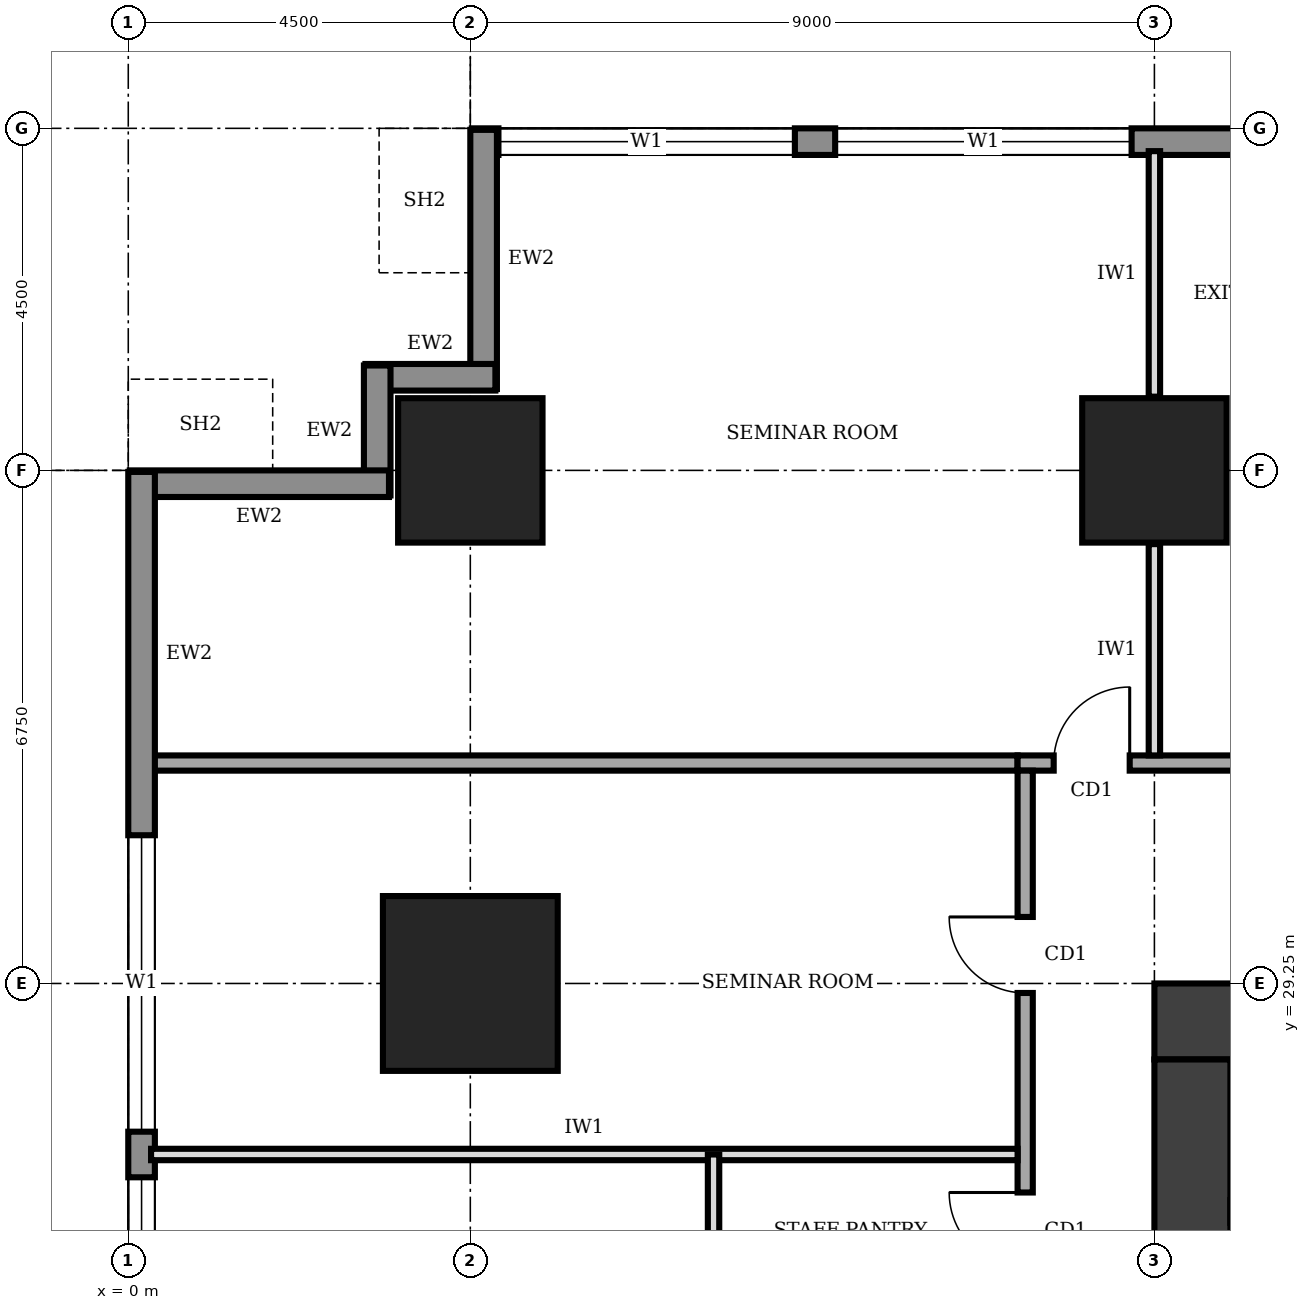
"""IFC4 building model, lengths in metres.
Left out: names, types, materials, properties, quantities, classifications, styles, units other than length and angle.
Written with IfcOpenShell. Run it as: python <this file> out.ifc"""

import sys

from ifc_helpers import new_model, si_unit, direction, frame, frame_2d, origin, origin_2d, place, context, subcontext, project, spatial, rectangle, extrude, element, fill, save


model = new_model("IFC4")
c1 = context("Model", 3, precision=1e-05, world=origin(), true_north=direction((0.0, 1.0)))
c2 = subcontext(c1, "Body", "Model", "MODEL_VIEW")
j1 = project(units=[si_unit("LENGTHUNIT", "METRE"), si_unit("PLANEANGLEUNIT", "RADIAN")], contexts=[c1])
p1 = place(None, origin())
s1 = spatial("IfcSite", under=j1, at=p1, CompositionType="ELEMENT")
p2 = place(p1, origin())
s2 = spatial("IfcBuilding", under=s1, at=p2, CompositionType="ELEMENT")
p3 = place(p2, frame((0.0, 0.0, 105.0)))
s3 = spatial("IfcBuildingStorey", under=s2, at=p3, CompositionType="ELEMENT", Elevation=105.0)
p4 = place(p3, frame((27.0, 28.75, 0.0), z_axis=(0.0, 0.0, 1.0), x_axis=(-1.0, 0.0, 0.0)))
e1 = element("IfcWall", 1, at=p4, inside=s3, PredefinedType="SHEAR", context=c2, shape_type="SweptSolid", body=[
    extrude(rectangle(XDim=13.5, YDim=1.0, at=frame_2d((6.75, 0.0))), origin(), (0.0, 0.0, 1.0), 4.0),
])
p5 = place(p4, frame((4.75, 0.0, 0.0)))
e2 = element("IfcOpeningElement", 2, at=p5, cuts=e1, PredefinedType="OPENING", context=c2, shape_type="SweptSolid", body=[
    extrude(rectangle(XDim=1.8, YDim=2.1, at=frame_2d((0.9, 1.05))), frame((0.0, 0.51, 0.0), z_axis=(0.0, -1.0, 0.0), x_axis=(1.0, 0.0, 0.0)), (0.0, 0.0, 1.0), 1.02),
])
p6 = place(p3, frame((14.0, 28.25, 0.0), z_axis=(0.0, 0.0, 1.0), x_axis=(0.0, -1.0, 0.0)))
e3 = element("IfcWall", 3, at=p6, inside=s3, PredefinedType="SHEAR", context=c2, shape_type="SweptSolid", body=[
    extrude(rectangle(XDim=16.0, YDim=1.0, at=frame_2d((8.0, 0.0))), origin(), (0.0, 0.0, 1.0), 4.0),
])
p7 = place(p3, frame((4.5, 29.25, 0.0), z_axis=(0.0, 0.0, 1.0), x_axis=(1.0, 0.0, 0.0)))
e4 = element("IfcColumn", 4, at=p7, inside=s3, PredefinedType="COLUMN", context=c2, shape_type="SweptSolid", body=[
    extrude(rectangle(XDim=2.3, YDim=2.3, at=origin_2d()), origin(), (0.0, 0.0, 1.0), 4.0),
])
for number, where, z_axis, x_axis in (
    (5, (4.5, 36.0, 0.0), (0.0, 0.0, 1.0), (1.0, 0.0, 0.0)),
    (6, (13.5, 36.0, 0.0), (0.0, 0.0, 1.0), (1.0, 0.0, 0.0)),
):
    element("IfcColumn", number, at=place(p3, frame(where, z_axis=z_axis, x_axis=x_axis)), inside=s3, PredefinedType="COLUMN", context=c2, shape_type="SweptSolid", body=[
        extrude(rectangle(XDim=1.9, YDim=1.9, at=origin_2d()), origin(), (0.0, 0.0, 1.0), 4.0),
    ])
p8 = place(p3, frame((35.98, 40.325, 0.0), z_axis=(0.0, 0.0, 1.0), x_axis=(-1.0, 0.0, 0.0)))
e7 = element("IfcWall", 7, at=p8, inside=s3, PredefinedType="STANDARD", context=c2, shape_type="SweptSolid", body=[
    extrude(rectangle(XDim=31.46, YDim=0.35, at=frame_2d((15.73, 0.0))), origin(), (0.0, 0.0, 1.0), 3.75),
])
p9 = place(p8, frame((27.21, 0.0, 0.9)))
e8 = element("IfcOpeningElement", 8, at=p9, cuts=e7, PredefinedType="OPENING", context=c2, shape_type="SweptSolid", body=[
    extrude(rectangle(XDim=3.9, YDim=2.2, at=frame_2d((1.95, 1.1))), frame((0.0, 0.185, 0.0), z_axis=(0.0, -1.0, 0.0), x_axis=(1.0, 0.0, 0.0)), (0.0, 0.0, 1.0), 0.37),
])
p10 = place(p8, frame((22.78, 0.0, 0.9)))
e9 = element("IfcOpeningElement", 9, at=p10, cuts=e7, PredefinedType="OPENING", context=c2, shape_type="SweptSolid", body=[
    extrude(rectangle(XDim=3.9, YDim=2.2, at=frame_2d((1.95, 1.1))), frame((0.0, 0.185, 0.0), z_axis=(0.0, -1.0, 0.0), x_axis=(1.0, 0.0, 0.0)), (0.0, 0.0, 1.0), 0.37),
])
p11 = place(p8, frame((4.78, 0.0, 0.9)))
e10 = element("IfcOpeningElement", 10, at=p11, cuts=e7, PredefinedType="OPENING", context=c2, shape_type="SweptSolid", body=[
    extrude(rectangle(XDim=3.9, YDim=2.2, at=frame_2d((1.95, 1.1))), frame((0.0, 0.185, 0.0), z_axis=(0.0, -1.0, 0.0), x_axis=(1.0, 0.0, 0.0)), (0.0, 0.0, 1.0), 0.37),
])
p12 = place(p3, frame((4.675, 40.48, 0.0), z_axis=(0.0, 0.0, 1.0), x_axis=(0.0, -1.0, 0.0)))
e11 = element("IfcWall", 11, at=p12, inside=s3, PredefinedType="STANDARD", context=c2, shape_type="SweptSolid", body=[
    extrude(rectangle(XDim=3.41, YDim=0.35, at=frame_2d((1.705, 0.0))), origin(), (0.0, 0.0, 1.0), 2.85),
])
for number, where, z_axis, x_axis in (
    (12, (4.83, 37.225, 0.0), (0.0, 0.0, 1.0), (-1.0, 0.0, 0.0)),
    (13, (3.275, 37.38, 0.0), (0.0, 0.0, 1.0), (0.0, -1.0, 0.0)),
):
    element("IfcWall", number, at=place(p3, frame(where, z_axis=z_axis, x_axis=x_axis)), inside=s3, PredefinedType="STANDARD", context=c2, shape_type="SweptSolid", body=[
        extrude(rectangle(XDim=1.71, YDim=0.35, at=frame_2d((0.855, 0.0))), origin(), (0.0, 0.0, 1.0), 3.75),
    ])
p13 = place(p3, frame((3.43, 35.825, 0.0), z_axis=(0.0, 0.0, 1.0), x_axis=(-1.0, 0.0, 0.0)))
e14 = element("IfcWall", 14, at=p13, inside=s3, PredefinedType="STANDARD", context=c2, shape_type="SweptSolid", body=[
    extrude(rectangle(XDim=3.41, YDim=0.35, at=frame_2d((1.705, 0.0))), origin(), (0.0, 0.0, 1.0), 2.85),
])
p14 = place(p3, frame((0.175, 35.98, 0.0), z_axis=(0.0, 0.0, 1.0), x_axis=(0.0, -1.0, 0.0)))
e15 = element("IfcWall", 15, at=p14, inside=s3, PredefinedType="STANDARD", context=c2, shape_type="SweptSolid", body=[
    extrude(rectangle(XDim=31.46, YDim=0.35, at=frame_2d((15.73, 0.0))), origin(), (0.0, 0.0, 1.0), 3.75),
])
p15 = place(p14, frame((27.21, 0.0, 0.9)))
e16 = element("IfcOpeningElement", 16, at=p15, cuts=e15, PredefinedType="OPENING", context=c2, shape_type="SweptSolid", body=[
    extrude(rectangle(XDim=3.9, YDim=2.2, at=frame_2d((1.95, 1.1))), frame((0.0, 0.185, 0.0), z_axis=(0.0, -1.0, 0.0), x_axis=(1.0, 0.0, 0.0)), (0.0, 0.0, 1.0), 0.37),
])
p16 = place(p14, frame((22.78, 0.0, 0.9)))
e17 = element("IfcOpeningElement", 17, at=p16, cuts=e15, PredefinedType="OPENING", context=c2, shape_type="SweptSolid", body=[
    extrude(rectangle(XDim=3.9, YDim=2.2, at=frame_2d((1.95, 1.1))), frame((0.0, 0.185, 0.0), z_axis=(0.0, -1.0, 0.0), x_axis=(1.0, 0.0, 0.0)), (0.0, 0.0, 1.0), 0.37),
])
p17 = place(p14, frame((18.28, 0.0, 0.9)))
e18 = element("IfcOpeningElement", 18, at=p17, cuts=e15, PredefinedType="OPENING", context=c2, shape_type="SweptSolid", body=[
    extrude(rectangle(XDim=3.9, YDim=2.2, at=frame_2d((1.95, 1.1))), frame((0.0, 0.185, 0.0), z_axis=(0.0, -1.0, 0.0), x_axis=(1.0, 0.0, 0.0)), (0.0, 0.0, 1.0), 0.37),
])
p18 = place(p14, frame((13.78, 0.0, 0.9)))
e19 = element("IfcOpeningElement", 19, at=p18, cuts=e15, PredefinedType="OPENING", context=c2, shape_type="SweptSolid", body=[
    extrude(rectangle(XDim=3.9, YDim=2.2, at=frame_2d((1.95, 1.1))), frame((0.0, 0.185, 0.0), z_axis=(0.0, -1.0, 0.0), x_axis=(1.0, 0.0, 0.0)), (0.0, 0.0, 1.0), 0.37),
])
p19 = place(p14, frame((9.28, 0.0, 0.9)))
e20 = element("IfcOpeningElement", 20, at=p19, cuts=e15, PredefinedType="OPENING", context=c2, shape_type="SweptSolid", body=[
    extrude(rectangle(XDim=3.9, YDim=2.2, at=frame_2d((1.95, 1.1))), frame((0.0, 0.185, 0.0), z_axis=(0.0, -1.0, 0.0), x_axis=(1.0, 0.0, 0.0)), (0.0, 0.0, 1.0), 0.37),
])
p20 = place(p14, frame((4.78, 0.0, 0.9)))
e21 = element("IfcOpeningElement", 21, at=p20, cuts=e15, PredefinedType="OPENING", context=c2, shape_type="SweptSolid", body=[
    extrude(rectangle(XDim=3.9, YDim=2.2, at=frame_2d((1.95, 1.1))), frame((0.0, 0.185, 0.0), z_axis=(0.0, -1.0, 0.0), x_axis=(1.0, 0.0, 0.0)), (0.0, 0.0, 1.0), 0.37),
])
p21 = place(p3, frame((28.6, 32.15, 0.0), z_axis=(0.0, 0.0, 1.0), x_axis=(-1.0, 0.0, 0.0)))
e22 = element("IfcWall", 22, at=p21, inside=s3, PredefinedType="SOLIDWALL", context=c2, shape_type="SweptSolid", body=[
    extrude(rectangle(XDim=16.9, YDim=0.2, at=frame_2d((8.45, 0.0))), origin(), (0.0, 0.0, 1.0), 3.75),
])
p22 = place(p21, frame((15.425, 0.0, 0.0)))
e23 = element("IfcOpeningElement", 23, at=p22, cuts=e22, PredefinedType="OPENING", context=c2, shape_type="SweptSolid", body=[
    extrude(rectangle(XDim=1.0, YDim=2.1, at=frame_2d((0.5, 1.05))), frame((0.0, 0.11, 0.0), z_axis=(0.0, -1.0, 0.0), x_axis=(1.0, 0.0, 0.0)), (0.0, 0.0, 1.0), 0.22),
])
p23 = place(p21, frame((12.35, 0.0, 0.0)))
e24 = element("IfcOpeningElement", 24, at=p23, cuts=e22, PredefinedType="OPENING", context=c2, shape_type="SweptSolid", body=[
    extrude(rectangle(XDim=1.0, YDim=2.1, at=frame_2d((0.5, 1.05))), frame((0.0, 0.11, 0.0), z_axis=(0.0, -1.0, 0.0), x_axis=(1.0, 0.0, 0.0)), (0.0, 0.0, 1.0), 0.22),
])
p24 = place(p21, frame((5.6, 0.0, 0.0)))
e25 = element("IfcOpeningElement", 25, at=p24, cuts=e22, PredefinedType="OPENING", context=c2, shape_type="SweptSolid", body=[
    extrude(rectangle(XDim=1.0, YDim=2.1, at=frame_2d((0.5, 1.05))), frame((0.0, 0.11, 0.0), z_axis=(0.0, -1.0, 0.0), x_axis=(1.0, 0.0, 0.0)), (0.0, 0.0, 1.0), 0.22),
])
p25 = place(p21, frame((0.275, 0.0, 0.0)))
e26 = element("IfcOpeningElement", 26, at=p25, cuts=e22, PredefinedType="OPENING", context=c2, shape_type="SweptSolid", body=[
    extrude(rectangle(XDim=1.0, YDim=2.1, at=frame_2d((0.5, 1.05))), frame((0.0, 0.11, 0.0), z_axis=(0.0, -1.0, 0.0), x_axis=(1.0, 0.0, 0.0)), (0.0, 0.0, 1.0), 0.22),
])
p26 = place(p3, frame((11.8, 32.05, 0.0), z_axis=(0.0, 0.0, 1.0), x_axis=(0.0, -1.0, 0.0)))
e27 = element("IfcWall", 27, at=p26, inside=s3, PredefinedType="SOLIDWALL", context=c2, shape_type="SweptSolid", body=[
    extrude(rectangle(XDim=23.8, YDim=0.2, at=frame_2d((11.9, 0.0))), origin(), (0.0, 0.0, 1.0), 3.75),
])
p27 = place(p26, frame((20.675, 0.0, 0.0)))
e28 = element("IfcOpeningElement", 28, at=p27, cuts=e27, PredefinedType="OPENING", context=c2, shape_type="SweptSolid", body=[
    extrude(rectangle(XDim=1.0, YDim=2.1, at=frame_2d((0.5, 1.05))), frame((0.0, 0.11, 0.0), z_axis=(0.0, -1.0, 0.0), x_axis=(1.0, 0.0, 0.0)), (0.0, 0.0, 1.0), 0.22),
])
p28 = place(p26, frame((16.2, 0.0, 0.0)))
e29 = element("IfcOpeningElement", 29, at=p28, cuts=e27, PredefinedType="OPENING", context=c2, shape_type="SweptSolid", body=[
    extrude(rectangle(XDim=0.9, YDim=2.1, at=frame_2d((0.45, 1.05))), frame((0.0, 0.11, 0.0), z_axis=(0.0, -1.0, 0.0), x_axis=(1.0, 0.0, 0.0)), (0.0, 0.0, 1.0), 0.22),
])
p29 = place(p26, frame((13.2, 0.0, 0.0)))
e30 = element("IfcOpeningElement", 30, at=p29, cuts=e27, PredefinedType="OPENING", context=c2, shape_type="SweptSolid", body=[
    extrude(rectangle(XDim=0.9, YDim=2.1, at=frame_2d((0.45, 1.05))), frame((0.0, 0.11, 0.0), z_axis=(0.0, -1.0, 0.0), x_axis=(1.0, 0.0, 0.0)), (0.0, 0.0, 1.0), 0.22),
])
p30 = place(p26, frame((8.35, 0.0, 0.0)))
e31 = element("IfcOpeningElement", 31, at=p30, cuts=e27, PredefinedType="OPENING", context=c2, shape_type="SweptSolid", body=[
    extrude(rectangle(XDim=0.9, YDim=2.1, at=frame_2d((0.45, 1.05))), frame((0.0, 0.11, 0.0), z_axis=(0.0, -1.0, 0.0), x_axis=(1.0, 0.0, 0.0)), (0.0, 0.0, 1.0), 0.22),
])
p31 = place(p26, frame((5.55, 0.0, 0.0)))
e32 = element("IfcOpeningElement", 32, at=p31, cuts=e27, PredefinedType="OPENING", context=c2, shape_type="SweptSolid", body=[
    extrude(rectangle(XDim=1.0, YDim=2.1, at=frame_2d((0.5, 1.05))), frame((0.0, 0.11, 0.0), z_axis=(0.0, -1.0, 0.0), x_axis=(1.0, 0.0, 0.0)), (0.0, 0.0, 1.0), 0.22),
])
p32 = place(p26, frame((11.05, 0.0, 0.0)))
e33 = element("IfcOpeningElement", 33, at=p32, cuts=e27, PredefinedType="OPENING", context=c2, shape_type="SweptSolid", body=[
    extrude(rectangle(XDim=1.0, YDim=2.1, at=frame_2d((0.5, 1.05))), frame((0.0, 0.11, 0.0), z_axis=(0.0, -1.0, 0.0), x_axis=(1.0, 0.0, 0.0)), (0.0, 0.0, 1.0), 0.22),
])
p33 = place(p26, frame((1.925, 0.0, 0.0)))
e34 = element("IfcOpeningElement", 34, at=p33, cuts=e27, PredefinedType="OPENING", context=c2, shape_type="SweptSolid", body=[
    extrude(rectangle(XDim=1.0, YDim=2.1, at=frame_2d((0.5, 1.05))), frame((0.0, 0.11, 0.0), z_axis=(0.0, -1.0, 0.0), x_axis=(1.0, 0.0, 0.0)), (0.0, 0.0, 1.0), 0.22),
])
p34 = place(p3, frame((0.3, 32.15, 0.0), z_axis=(0.0, 0.0, 1.0), x_axis=(1.0, 0.0, 0.0)))
e35 = element("IfcWall", 35, at=p34, inside=s3, PredefinedType="SOLIDWALL", context=c2, shape_type="SweptSolid", body=[
    extrude(rectangle(XDim=11.4, YDim=0.2, at=frame_2d((5.7, 0.0))), origin(), (0.0, 0.0, 1.0), 3.75),
])
p35 = place(p3, frame((13.5, 32.25, 0.0), z_axis=(0.0, 0.0, 1.0), x_axis=(0.0, 1.0, 0.0)))
e36 = element("IfcWall", 36, at=p35, inside=s3, PredefinedType="PARTITIONING", context=c2, shape_type="SweptSolid", body=[
    extrude(rectangle(XDim=2.78, YDim=0.15, at=frame_2d((1.39, 0.0))), origin(), (0.0, 0.0, 1.0), 2.85),
])
p36 = place(p3, frame((13.5, 36.97, 0.0), z_axis=(0.0, 0.0, 1.0), x_axis=(0.0, 1.0, 0.0)))
e37 = element("IfcWall", 37, at=p36, inside=s3, PredefinedType="PARTITIONING", context=c2, shape_type="SweptSolid", body=[
    extrude(rectangle(XDim=3.23, YDim=0.15, at=frame_2d((1.615, 0.0))), origin(), (0.0, 0.0, 1.0), 2.85),
])
p37 = place(p3, frame((0.3, 27.0, 0.0), z_axis=(0.0, 0.0, 1.0), x_axis=(1.0, 0.0, 0.0)))
e38 = element("IfcWall", 38, at=p37, inside=s3, PredefinedType="PARTITIONING", context=c2, shape_type="SweptSolid", body=[
    extrude(rectangle(XDim=11.4, YDim=0.15, at=frame_2d((5.7, 0.0))), origin(), (0.0, 0.0, 1.0), 3.75),
])
p38 = place(p3, frame((7.7, 25.0, 0.0), z_axis=(0.0, 0.0, 1.0), x_axis=(0.0, 1.0, 0.0)))
e39 = element("IfcWall", 39, at=p38, inside=s3, PredefinedType="PARTITIONING", context=c2, shape_type="SweptSolid", body=[
    extrude(rectangle(XDim=2.0, YDim=0.15, at=frame_2d((1.0, 0.0))), origin(), (0.0, 0.0, 1.0), 3.75),
])
p39 = place(p9, origin())
e40 = element("IfcWindow", 40, at=p39, inside=s3, PartitioningType="SINGLE_PANEL", PredefinedType="WINDOW", context=c2, shape_type="SweptSolid", body=[
    extrude(rectangle(XDim=3.9, YDim=2.2, at=frame_2d((1.95, 1.1))), frame((0.0, 0.03, 0.0), z_axis=(0.0, -1.0, 0.0), x_axis=(1.0, 0.0, 0.0)), (0.0, 0.0, 1.0), 0.06),
])
fill(e8, e40)
p40 = place(p10, origin())
e41 = element("IfcWindow", 41, at=p40, inside=s3, PartitioningType="SINGLE_PANEL", PredefinedType="WINDOW", context=c2, shape_type="SweptSolid", body=[
    extrude(rectangle(XDim=3.9, YDim=2.2, at=frame_2d((1.95, 1.1))), frame((0.0, 0.03, 0.0), z_axis=(0.0, -1.0, 0.0), x_axis=(1.0, 0.0, 0.0)), (0.0, 0.0, 1.0), 0.06),
])
fill(e9, e41)
p41 = place(p19, origin())
e42 = element("IfcWindow", 42, at=p41, inside=s3, PartitioningType="SINGLE_PANEL", PredefinedType="WINDOW", context=c2, shape_type="SweptSolid", body=[
    extrude(rectangle(XDim=3.9, YDim=2.2, at=frame_2d((1.95, 1.1))), frame((0.0, 0.03, 0.0), z_axis=(0.0, -1.0, 0.0), x_axis=(1.0, 0.0, 0.0)), (0.0, 0.0, 1.0), 0.06),
])
fill(e20, e42)
p42 = place(p20, origin())
e43 = element("IfcWindow", 43, at=p42, inside=s3, PartitioningType="SINGLE_PANEL", PredefinedType="WINDOW", context=c2, shape_type="SweptSolid", body=[
    extrude(rectangle(XDim=3.9, YDim=2.2, at=frame_2d((1.95, 1.1))), frame((0.0, 0.03, 0.0), z_axis=(0.0, -1.0, 0.0), x_axis=(1.0, 0.0, 0.0)), (0.0, 0.0, 1.0), 0.06),
])
fill(e21, e43)
p43 = place(p22, frame((1.0, 0.0, 0.0), z_axis=(0.0, 0.0, 1.0), x_axis=(-1.0, 0.0, 0.0)))
e44 = element("IfcDoor", 44, at=p43, inside=s3, OperationType="SINGLE_SWING_RIGHT", PredefinedType="DOOR", context=c2, shape_type="SweptSolid", body=[
    extrude(rectangle(XDim=1.0, YDim=2.1, at=frame_2d((0.5, 1.05))), frame((0.0, 0.025, 0.0), z_axis=(0.0, -1.0, 0.0), x_axis=(1.0, 0.0, 0.0)), (0.0, 0.0, 1.0), 0.05),
])
fill(e23, e44)
p44 = place(p31, frame((1.0, 0.0, 0.0), z_axis=(0.0, 0.0, 1.0), x_axis=(-1.0, 0.0, 0.0)))
e45 = element("IfcDoor", 45, at=p44, inside=s3, OperationType="SINGLE_SWING_RIGHT", PredefinedType="DOOR", context=c2, shape_type="SweptSolid", body=[
    extrude(rectangle(XDim=1.0, YDim=2.1, at=frame_2d((0.5, 1.05))), frame((0.0, 0.025, 0.0), z_axis=(0.0, -1.0, 0.0), x_axis=(1.0, 0.0, 0.0)), (0.0, 0.0, 1.0), 0.05),
])
fill(e32, e45)
p45 = place(p33, frame((1.0, 0.0, 0.0), z_axis=(0.0, 0.0, 1.0), x_axis=(-1.0, 0.0, 0.0)))
e46 = element("IfcDoor", 46, at=p45, inside=s3, OperationType="SINGLE_SWING_RIGHT", PredefinedType="DOOR", context=c2, shape_type="SweptSolid", body=[
    extrude(rectangle(XDim=1.0, YDim=2.1, at=frame_2d((0.5, 1.05))), frame((0.0, 0.025, 0.0), z_axis=(0.0, -1.0, 0.0), x_axis=(1.0, 0.0, 0.0)), (0.0, 0.0, 1.0), 0.05),
])
fill(e34, e46)
save(model, sys.argv[1])
